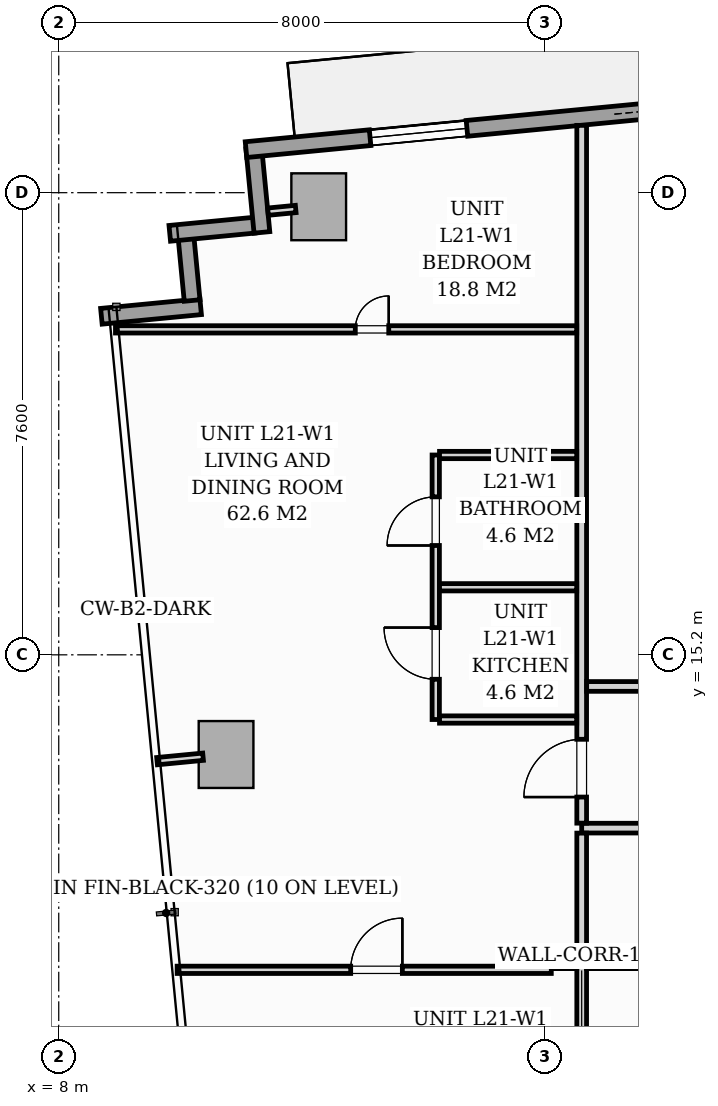
"""IFC4 building model, lengths in metres.
Left out: names, types, materials, properties, quantities, classifications, styles, units other than length and angle.
Written with IfcOpenShell. Run it as: python <this file> out.ifc"""

import sys

from ifc_helpers import new_model, si_unit, direction, frame, frame_2d, origin, origin_2d, place, context, subcontext, project, spatial, rectangle, extrude, source, transform, mapped, element, fill, save


model = new_model("IFC4")
c1 = context("Model", 3, precision=1e-05, world=origin(), true_north=direction((0.0, 1.0)))
c2 = subcontext(c1, "Body", "Model", "MODEL_VIEW")
j1 = project(units=[si_unit("LENGTHUNIT", "METRE"), si_unit("PLANEANGLEUNIT", "RADIAN")], contexts=[c1])
p1 = place(None, origin())
s1 = spatial("IfcSite", under=j1, at=p1, CompositionType="ELEMENT")
p2 = place(p1, origin())
s2 = spatial("IfcBuilding", under=s1, at=p2, CompositionType="ELEMENT")
p3 = place(p2, frame((0.0, 0.0, 77.8)))
s3 = spatial("IfcBuildingStorey", under=s2, at=p3, CompositionType="ELEMENT", Elevation=77.8)
m1 = source(origin(), c2, "Body", "SweptSolid", [
    extrude(rectangle(XDim=0.9, YDim=1.1, at=origin_2d()), origin(), (0.0, 0.0, 1.0), 3.194),
])
for number, where, z_axis, x_axis in (
    (1, (12.275, 22.568, 0.004), (0.0, 0.0, 1.0), (0.995, 0.096, 0.0)),
    (2, (10.752, 13.561, 0.004), (0.0, 0.0, 1.0), (0.995, 0.096, 0.0)),
):
    element("IfcColumn", number, at=place(p3, frame(where, z_axis=z_axis, x_axis=x_axis)), inside=s3, PredefinedType="COLUMN", context=c2, shape_type="MappedRepresentation", body=[
        mapped(m1, transform((0.0, 0.0, 0.0), scale=1.0)),
    ])
p4 = place(p3, frame((8.701, 20.767, 0.0), z_axis=(0.0, 0.0, 1.0), x_axis=(0.995394563142, 0.095862733462, 0.0)))
e3 = element("IfcWall", 3, at=p4, inside=s3, PredefinedType="STANDARD", context=c2, shape_type="SweptSolid", body=[
    extrude(rectangle(XDim=1.64, YDim=0.26, at=frame_2d((0.82, 0.0))), origin(), (0.0, 0.0, 1.0), 2.94),
])
p5 = place(p3, frame((10.193, 21.027, 0.0), z_axis=(0.0, 0.0, 1.0), x_axis=(-0.095740721699, 0.995406306092, 0.0)))
e4 = element("IfcWall", 4, at=p5, inside=s3, PredefinedType="STANDARD", context=c2, shape_type="SweptSolid", body=[
    extrude(rectangle(XDim=1.15, YDim=0.26, at=frame_2d((0.575, 0.0))), origin(), (0.0, 0.0, 1.0), 2.94),
])
p6 = place(p3, frame((9.826, 22.131, 0.0), z_axis=(0.0, 0.0, 1.0), x_axis=(0.995389446633, 0.095915846097, 0.0)))
e5 = element("IfcWall", 5, at=p6, inside=s3, PredefinedType="STANDARD", context=c2, shape_type="SweptSolid", body=[
    extrude(rectangle(XDim=1.395, YDim=0.26, at=frame_2d((0.697, 0.0))), origin(), (0.0, 0.0, 1.0), 2.94),
])
p7 = place(p3, frame((11.341, 22.147, 0.0), z_axis=(0.0, 0.0, 1.0), x_axis=(-0.09589913835, 0.995391056452, 0.0)))
e6 = element("IfcWall", 6, at=p7, inside=s3, PredefinedType="STANDARD", context=c2, shape_type="SweptSolid", body=[
    extrude(rectangle(XDim=1.395, YDim=0.26, at=frame_2d((0.698, 0.0))), origin(), (0.0, 0.0, 1.0), 2.94),
])
p8 = place(p3, frame((11.08, 23.508, 0.0), z_axis=(0.0, 0.0, 1.0), x_axis=(0.995396638587, 0.095841180552, 0.0)))
e7 = element("IfcWall", 7, at=p8, inside=s3, PredefinedType="STANDARD", context=c2, shape_type="SweptSolid", body=[
    extrude(rectangle(XDim=19.11, YDim=0.26, at=frame_2d((9.555, 0.0))), origin(), (0.0, 0.0, 1.0), 2.94),
])
p9 = place(p8, frame((6.896, 0.0, 0.0)))
e8 = element("IfcOpeningElement", 8, at=p9, cuts=e7, PredefinedType="OPENING", context=c2, shape_type="SweptSolid", body=[
    extrude(rectangle(XDim=1.8, YDim=2.06, at=frame_2d((0.9, 1.03))), frame((0.0, 0.14, 0.0), z_axis=(0.0, -1.0, 0.0), x_axis=(1.0, 0.0, 0.0)), (0.0, 0.0, 1.0), 0.28),
])
p10 = place(p8, frame((2.05, 0.0, 0.65)))
e9 = element("IfcOpeningElement", 9, at=p10, cuts=e7, PredefinedType="OPENING", context=c2, shape_type="SweptSolid", body=[
    extrude(rectangle(XDim=1.6, YDim=1.5, at=frame_2d((0.8, 0.75))), frame((0.0, 0.14, 0.0), z_axis=(0.0, -1.0, 0.0), x_axis=(1.0, 0.0, 0.0)), (0.0, 0.0, 1.0), 0.28),
])
p11 = place(p3, frame((16.6, 12.35, 0.0), z_axis=(0.0, 0.0, 1.0), x_axis=(1.0, 0.0, 0.0)))
e10 = element("IfcWall", 10, at=p11, inside=s3, PredefinedType="PARTITIONING", context=c2, shape_type="SweptSolid", body=[
    extrude(rectangle(XDim=37.6, YDim=0.16, at=frame_2d((18.8, 0.0))), origin(), (0.0, 0.0, 1.0), 2.94),
])
p12 = place(p11, frame((2.091, 0.0, 0.0)))
e11 = element("IfcOpeningElement", 11, at=p12, cuts=e10, PredefinedType="OPENING", context=c2, shape_type="SweptSolid", body=[
    extrude(rectangle(XDim=0.95, YDim=2.06, at=frame_2d((0.475, 1.03))), frame((0.0, 0.09, 0.0), z_axis=(0.0, -1.0, 0.0), x_axis=(1.0, 0.0, 0.0)), (0.0, 0.0, 1.0), 0.18),
])
p13 = place(p11, frame((26.146, 0.0, 0.0)))
e12 = element("IfcOpeningElement", 12, at=p13, cuts=e10, PredefinedType="OPENING", context=c2, shape_type="SweptSolid", body=[
    extrude(rectangle(XDim=0.95, YDim=2.06, at=frame_2d((0.475, 1.03))), frame((0.0, 0.09, 0.0), z_axis=(0.0, -1.0, 0.0), x_axis=(1.0, 0.0, 0.0)), (0.0, 0.0, 1.0), 0.18),
])
p14 = place(p3, frame((16.6, 4.341, 0.0), z_axis=(0.0, 0.0, 1.0), x_axis=(0.0, 1.0, 0.0)))
e13 = element("IfcWall", 13, at=p14, inside=s3, PredefinedType="PARTITIONING", context=c2, shape_type="SweptSolid", body=[
    extrude(rectangle(XDim=7.927, YDim=0.16, at=frame_2d((3.964, 0.0))), origin(), (0.0, 0.0, 1.0), 2.94),
])
p15 = place(p3, frame((16.6, 12.432, 0.0), z_axis=(0.0, 0.0, 1.0), x_axis=(0.0, 1.0, 0.0)))
e14 = element("IfcWall", 14, at=p15, inside=s3, PredefinedType="PARTITIONING", context=c2, shape_type="SweptSolid", body=[
    extrude(rectangle(XDim=11.475, YDim=0.16, at=frame_2d((5.738, 0.0))), origin(), (0.0, 0.0, 1.0), 2.94),
])
p16 = place(p15, frame((0.429, 0.0, 0.0)))
e15 = element("IfcOpeningElement", 15, at=p16, cuts=e14, PredefinedType="OPENING", context=c2, shape_type="SweptSolid", body=[
    extrude(rectangle(XDim=0.95, YDim=2.06, at=frame_2d((0.475, 1.03))), frame((0.0, 0.09, 0.0), z_axis=(0.0, -1.0, 0.0), x_axis=(1.0, 0.0, 0.0)), (0.0, 0.0, 1.0), 0.18),
])
p17 = place(p3, frame((16.1, 10.1, 0.0), z_axis=(0.0, 0.0, 1.0), x_axis=(1.0, 0.0, 0.0)))
e16 = element("IfcWall", 16, at=p17, inside=s3, PredefinedType="PARTITIONING", context=c2, shape_type="SweptSolid", body=[
    extrude(rectangle(XDim=0.418, YDim=0.12, at=frame_2d((0.209, 0.0))), origin(), (0.0, 0.0, 1.0), 2.94),
])
p18 = place(p3, frame((16.682, 10.1, 0.0), z_axis=(0.0, 0.0, 1.0), x_axis=(1.0, 0.0, 0.0)))
e17 = element("IfcWall", 17, at=p18, inside=s3, PredefinedType="PARTITIONING", context=c2, shape_type="SweptSolid", body=[
    extrude(rectangle(XDim=2.123, YDim=0.12, at=frame_2d((1.062, 0.0))), origin(), (0.0, 0.0, 1.0), 2.94),
])
p19 = place(p3, frame((14.2, 14.136, 0.0), z_axis=(0.0, 0.0, 1.0), x_axis=(0.0, 1.0, 0.0)))
e18 = element("IfcWall", 18, at=p19, inside=s3, PredefinedType="PARTITIONING", context=c2, shape_type="SweptSolid", body=[
    extrude(rectangle(XDim=4.35, YDim=0.12, at=frame_2d((2.175, 0.0))), origin(), (0.0, 0.0, 1.0), 2.94),
])
p20 = place(p19, frame((0.662, 0.0, 0.0)))
e19 = element("IfcOpeningElement", 19, at=p20, cuts=e18, PredefinedType="OPENING", context=c2, shape_type="SweptSolid", body=[
    extrude(rectangle(XDim=0.85, YDim=2.05, at=frame_2d((0.425, 1.025))), frame((0.0, 0.07, 0.0), z_axis=(0.0, -1.0, 0.0), x_axis=(1.0, 0.0, 0.0)), (0.0, 0.0, 1.0), 0.14),
])
p21 = place(p19, frame((2.862, 0.0, 0.0)))
e20 = element("IfcOpeningElement", 20, at=p21, cuts=e18, PredefinedType="OPENING", context=c2, shape_type="SweptSolid", body=[
    extrude(rectangle(XDim=0.8, YDim=2.02, at=frame_2d((0.4, 1.01))), frame((0.0, 0.07, 0.0), z_axis=(0.0, -1.0, 0.0), x_axis=(1.0, 0.0, 0.0)), (0.0, 0.0, 1.0), 0.14),
])
for number, where, z_axis, x_axis in (
    (21, (14.262, 16.311, 0.0), (0.0, 0.0, 1.0), (1.0, 0.0, 0.0)),
    (22, (14.262, 14.136, 0.0), (0.0, 0.0, 1.0), (1.0, 0.0, 0.0)),
    (23, (14.262, 18.486, 0.0), (0.0, 0.0, 1.0), (1.0, 0.0, 0.0)),
):
    element("IfcWall", number, at=place(p3, frame(where, z_axis=z_axis, x_axis=x_axis)), inside=s3, PredefinedType="PARTITIONING", context=c2, shape_type="SweptSolid", body=[
        extrude(rectangle(XDim=2.256, YDim=0.12, at=frame_2d((1.128, 0.0))), origin(), (0.0, 0.0, 1.0), 2.94),
    ])
p22 = place(p3, frame((8.933, 20.552, 0.0), z_axis=(0.0, 0.0, 1.0), x_axis=(1.0, 0.0, 0.0)))
e24 = element("IfcWall", 24, at=p22, inside=s3, PredefinedType="PARTITIONING", context=c2, shape_type="SweptSolid", body=[
    extrude(rectangle(XDim=7.585, YDim=0.12, at=frame_2d((3.792, 0.0))), origin(), (0.0, 0.0, 1.0), 2.94),
])
p23 = place(p22, frame((3.944, 0.0, 0.0)))
e25 = element("IfcOpeningElement", 25, at=p23, cuts=e24, PredefinedType="OPENING", context=c2, shape_type="SweptSolid", body=[
    extrude(rectangle(XDim=0.55, YDim=2.0, at=frame_2d((0.275, 1.0))), frame((0.0, 0.07, 0.0), z_axis=(0.0, -1.0, 0.0), x_axis=(1.0, 0.0, 0.0)), (0.0, 0.0, 1.0), 0.14),
])
p24 = place(p3, frame((9.947, 10.02, 0.0), z_axis=(0.0, 0.0, 1.0), x_axis=(1.0, 0.0, 0.0)))
e26 = element("IfcWall", 26, at=p24, inside=s3, PredefinedType="PARTITIONING", context=c2, shape_type="SweptSolid", body=[
    extrude(rectangle(XDim=6.153, YDim=0.12, at=frame_2d((3.076, 0.0))), origin(), (0.0, 0.0, 1.0), 2.94),
])
p25 = place(p24, frame((2.854, 0.0, 0.0)))
e27 = element("IfcOpeningElement", 27, at=p25, cuts=e26, PredefinedType="OPENING", context=c2, shape_type="SweptSolid", body=[
    extrude(rectangle(XDim=0.85, YDim=2.05, at=frame_2d((0.425, 1.025))), frame((0.0, 0.07, 0.0), z_axis=(0.0, -1.0, 0.0), x_axis=(1.0, 0.0, 0.0)), (0.0, 0.0, 1.0), 0.14),
])
p26 = place(p3, frame((16.682, 14.68, 0.0), z_axis=(0.0, 0.0, 1.0), x_axis=(1.0, 0.0, 0.0)))
e28 = element("IfcWall", 28, at=p26, inside=s3, PredefinedType="PARTITIONING", context=c2, shape_type="SweptSolid", body=[
    extrude(rectangle(XDim=9.478, YDim=0.16, at=frame_2d((4.739, 0.0))), origin(), (0.0, 0.0, 1.0), 2.94),
])
p27 = place(p26, frame((4.163, 0.0, 0.0)))
e29 = element("IfcOpeningElement", 29, at=p27, cuts=e28, PredefinedType="OPENING", context=c2, shape_type="SweptSolid", body=[
    extrude(rectangle(XDim=0.95, YDim=2.06, at=frame_2d((0.475, 1.03))), frame((0.0, 0.09, 0.0), z_axis=(0.0, -1.0, 0.0), x_axis=(1.0, 0.0, 0.0)), (0.0, 0.0, 1.0), 0.18),
])
p28 = place(p3, frame((11.897, 22.532, 0.0), z_axis=(0.0, 0.0, 1.0), x_axis=(-0.995384576284, -0.09596637586, 0.0)))
e30 = element("IfcWall", 30, at=p28, inside=s3, PredefinedType="PARTITIONING", context=c2, shape_type="SweptSolid", body=[
    extrude(rectangle(XDim=0.458, YDim=0.12, at=frame_2d((0.229, 0.0))), origin(), (0.0, 0.0, 1.0), 2.94),
])
p29 = place(p3, frame((10.373, 13.524, 0.0), z_axis=(0.0, 0.0, 1.0), x_axis=(-0.995377786728, -0.096036772582, 0.0)))
e31 = element("IfcWall", 31, at=p29, inside=s3, PredefinedType="PARTITIONING", context=c2, shape_type="SweptSolid", body=[
    extrude(rectangle(XDim=0.76, YDim=0.12, at=frame_2d((0.38, 0.0))), origin(), (0.0, 0.0, 1.0), 2.94),
])
m2 = source(origin(), c2, "Body", "SweptSolid", [
    extrude(rectangle(XDim=1.6, YDim=1.5, at=frame_2d((0.8, 0.75))), frame((0.0, 0.03, 0.0), z_axis=(0.0, -1.0, 0.0), x_axis=(1.0, 0.0, 0.0)), (0.0, 0.0, 1.0), 0.06),
])
p30 = place(p10, origin())
e32 = element("IfcWindow", 32, at=p30, inside=s3, PartitioningType="SINGLE_PANEL", PredefinedType="WINDOW", context=c2, shape_type="MappedRepresentation", body=[
    mapped(m2, transform((0.0, 0.0, 0.0), scale=1.0)),
])
fill(e9, e32)
m3 = source(origin(), c2, "Body", "SweptSolid", [
    extrude(rectangle(XDim=0.95, YDim=2.06, at=frame_2d((0.475, 1.03))), frame((0.0, 0.025, 0.0), z_axis=(0.0, -1.0, 0.0), x_axis=(1.0, 0.0, 0.0)), (0.0, 0.0, 1.0), 0.05),
])
p31 = place(p16, origin())
e33 = element("IfcDoor", 33, at=p31, inside=s3, OperationType="SINGLE_SWING_LEFT", PredefinedType="DOOR", context=c2, shape_type="MappedRepresentation", body=[
    mapped(m3, transform((0.0, 0.0, 0.0), scale=1.0)),
])
fill(e15, e33)
m4 = source(origin(), c2, "Body", "SweptSolid", [
    extrude(rectangle(XDim=0.85, YDim=2.05, at=frame_2d((0.425, 1.025))), frame((0.0, 0.025, 0.0), z_axis=(0.0, -1.0, 0.0), x_axis=(1.0, 0.0, 0.0)), (0.0, 0.0, 1.0), 0.05),
])
p32 = place(p20, origin())
e34 = element("IfcDoor", 34, at=p32, inside=s3, OperationType="SINGLE_SWING_RIGHT", PredefinedType="DOOR", context=c2, shape_type="MappedRepresentation", body=[
    mapped(m4, transform((0.0, 0.0, 0.0), scale=1.0)),
])
fill(e19, e34)
m5 = source(origin(), c2, "Body", "SweptSolid", [
    extrude(rectangle(XDim=0.8, YDim=2.02, at=frame_2d((0.4, 1.01))), frame((0.0, 0.025, 0.0), z_axis=(0.0, -1.0, 0.0), x_axis=(1.0, 0.0, 0.0)), (0.0, 0.0, 1.0), 0.05),
])
p33 = place(p21, origin())
e35 = element("IfcDoor", 35, at=p33, inside=s3, OperationType="SINGLE_SWING_LEFT", PredefinedType="DOOR", context=c2, shape_type="MappedRepresentation", body=[
    mapped(m5, transform((0.0, 0.0, 0.0), scale=1.0)),
])
fill(e20, e35)
m6 = source(origin(), c2, "Body", "SweptSolid", [
    extrude(rectangle(XDim=0.55, YDim=2.0, at=frame_2d((0.275, 1.0))), frame((0.0, 0.025, 0.0), z_axis=(0.0, -1.0, 0.0), x_axis=(1.0, 0.0, 0.0)), (0.0, 0.0, 1.0), 0.05),
])
p34 = place(p23, origin())
e36 = element("IfcDoor", 36, at=p34, inside=s3, OperationType="SINGLE_SWING_RIGHT", PredefinedType="DOOR", context=c2, shape_type="MappedRepresentation", body=[
    mapped(m6, transform((0.0, 0.0, 0.0), scale=1.0)),
])
fill(e25, e36)
p35 = place(p25, origin())
e37 = element("IfcDoor", 37, at=p35, inside=s3, OperationType="SINGLE_SWING_RIGHT", PredefinedType="DOOR", context=c2, shape_type="MappedRepresentation", body=[
    mapped(m4, transform((0.0, 0.0, 0.0), scale=1.0)),
])
fill(e27, e37)
save(model, sys.argv[1])
